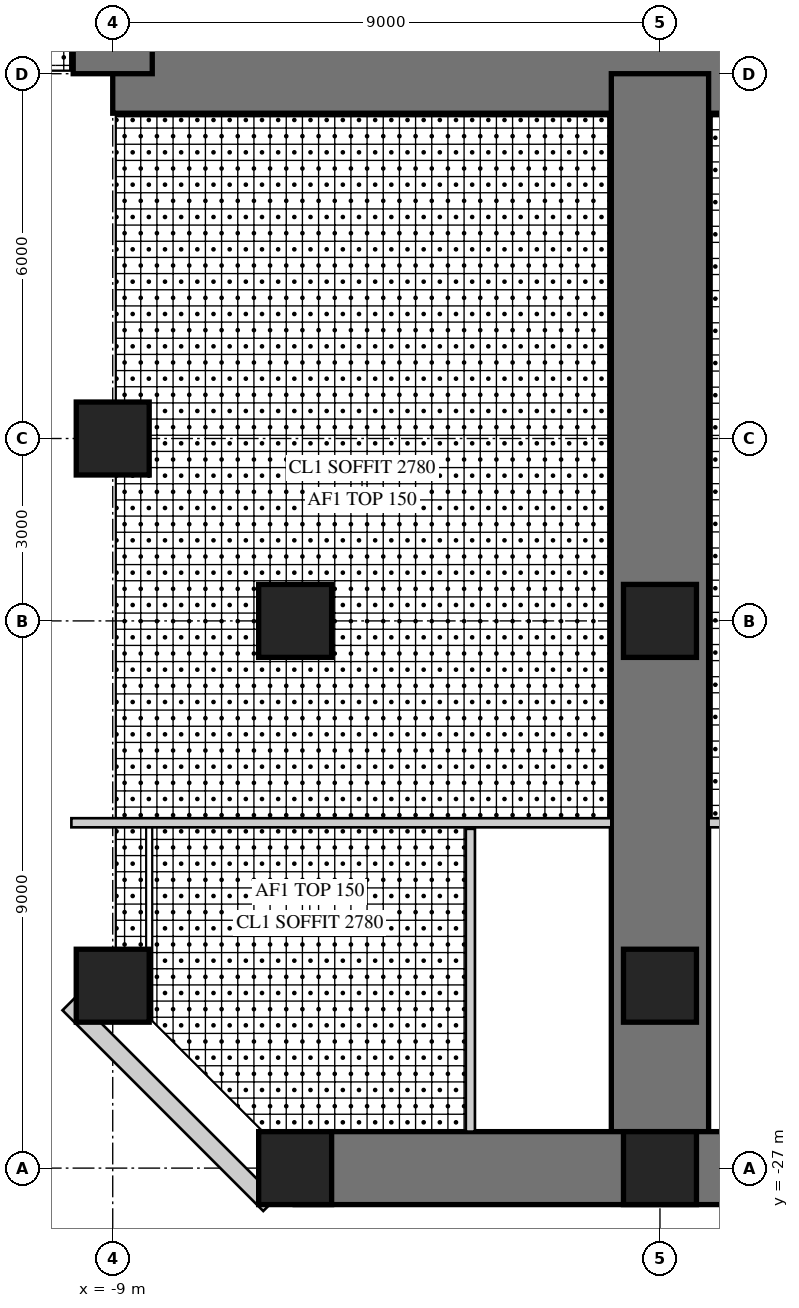
"""IFC4 building model, lengths in metres.
Left out: names, types, materials, properties, quantities, classifications, styles, units other than length and angle.
Written with IfcOpenShell. Run it as: python <this file> out.ifc"""

import sys

from ifc_helpers import new_model, si_unit, direction, frame, frame_2d, origin, origin_2d, place, context, subcontext, project, spatial, rectangle, hollow_rectangle, extrude, element, fill, save


model = new_model("IFC4")
c1 = context("Model", 3, precision=1e-05, world=origin(), true_north=direction((0.0, 1.0)))
c2 = subcontext(c1, "Body", "Model", "MODEL_VIEW")
j1 = project(units=[si_unit("LENGTHUNIT", "METRE"), si_unit("PLANEANGLEUNIT", "RADIAN")], contexts=[c1])
p1 = place(None, origin())
s1 = spatial("IfcSite", under=j1, at=p1, CompositionType="ELEMENT")
p2 = place(p1, origin())
s2 = spatial("IfcBuilding", under=s1, at=p2, CompositionType="ELEMENT")
p3 = place(p2, frame((0.0, 0.0, 27.5)))
s3 = spatial("IfcBuildingStorey", under=s2, at=p3, CompositionType="ELEMENT", Elevation=27.5)
p4 = place(p3, frame((-9.0, -9.0, 0.0), z_axis=(0.0, 0.0, 1.0), x_axis=(1.0, 0.0, 0.0)))
e1 = element("IfcWall", 1, at=p4, inside=s3, PredefinedType="SHEAR", context=c2, shape_type="SweptSolid", body=[
    extrude(rectangle(XDim=18.0, YDim=1.3, at=frame_2d((9.0, 0.0))), origin(), (0.0, 0.0, 1.0), 4.0),
])
p5 = place(p4, frame((9.8, 0.0, 0.0)))
e2 = element("IfcOpeningElement", 2, at=p5, cuts=e1, PredefinedType="OPENING", context=c2, shape_type="SweptSolid", body=[
    extrude(rectangle(XDim=1.0, YDim=2.4, at=frame_2d((0.5, 1.2))), frame((0.0, 0.66, 0.0), z_axis=(0.0, -1.0, 0.0), x_axis=(1.0, 0.0, 0.0)), (0.0, 0.0, 1.0), 1.32),
])
p6 = place(p3, frame((-9.0, 9.0, 0.0), z_axis=(0.0, 0.0, 1.0), x_axis=(0.0, -1.0, 0.0)))
e3 = element("IfcWall", 3, at=p6, inside=s3, PredefinedType="SHEAR", context=c2, shape_type="SweptSolid", body=[
    extrude(rectangle(XDim=18.0, YDim=1.3, at=frame_2d((9.0, 0.0))), origin(), (0.0, 0.0, 1.0), 4.0),
])
p7 = place(p6, frame((9.8, 0.0, 0.0)))
e4 = element("IfcOpeningElement", 4, at=p7, cuts=e3, PredefinedType="OPENING", context=c2, shape_type="SweptSolid", body=[
    extrude(rectangle(XDim=1.0, YDim=2.4, at=frame_2d((0.5, 1.2))), frame((0.0, 0.66, 0.0), z_axis=(0.0, -1.0, 0.0), x_axis=(1.0, 0.0, 0.0)), (0.0, 0.0, 1.0), 1.32),
])
p8 = place(p3, frame((0.0, -9.0, 0.0), z_axis=(0.0, 0.0, 1.0), x_axis=(0.0, -1.0, 0.0)))
e5 = element("IfcWall", 5, at=p8, inside=s3, PredefinedType="SHEAR", context=c2, shape_type="SweptSolid", body=[
    extrude(rectangle(XDim=18.0, YDim=1.6, at=frame_2d((9.0, 0.0))), origin(), (0.0, 0.0, 1.0), 4.0),
])
p9 = place(p8, frame((9.9, 0.0, 0.0)))
e6 = element("IfcOpeningElement", 6, at=p9, cuts=e5, PredefinedType="OPENING", context=c2, shape_type="SweptSolid", body=[
    extrude(rectangle(XDim=1.0, YDim=2.2, at=frame_2d((0.5, 1.1))), frame((0.0, 0.81, 0.0), z_axis=(0.0, -1.0, 0.0), x_axis=(1.0, 0.0, 0.0)), (0.0, 0.0, 1.0), 1.62),
])
p10 = place(p3, frame((-6.0, -27.0, 0.0), z_axis=(0.0, 0.0, 1.0), x_axis=(1.0, 0.0, 0.0)))
e7 = element("IfcWall", 7, at=p10, inside=s3, PredefinedType="SHEAR", context=c2, shape_type="SweptSolid", body=[
    extrude(rectangle(XDim=12.0, YDim=1.2, at=frame_2d((6.0, 0.0))), origin(), (0.0, 0.0, 1.0), 4.0),
])
p11 = place(p10, frame((1.5, 0.0, 0.6)))
e8 = element("IfcOpeningElement", 8, at=p11, cuts=e7, PredefinedType="OPENING", context=c2, shape_type="SweptSolid", body=[
    extrude(rectangle(XDim=3.0, YDim=2.4, at=frame_2d((1.5, 1.2))), frame((0.0, 0.61, 0.0), z_axis=(0.0, -1.0, 0.0), x_axis=(1.0, 0.0, 0.0)), (0.0, 0.0, 1.0), 1.22),
])
p12 = place(p10, frame((7.5, 0.0, 0.6)))
e9 = element("IfcOpeningElement", 9, at=p12, cuts=e7, PredefinedType="OPENING", context=c2, shape_type="SweptSolid", body=[
    extrude(rectangle(XDim=3.0, YDim=2.4, at=frame_2d((1.5, 1.2))), frame((0.0, 0.61, 0.0), z_axis=(0.0, -1.0, 0.0), x_axis=(1.0, 0.0, 0.0)), (0.0, 0.0, 1.0), 1.22),
])
for number, where, z_axis, x_axis in (
    (10, (-9.0, -15.0, 0.0), (0.0, 0.0, 1.0), (1.0, 0.0, 0.0)),
    (11, (-9.0, -24.0, 0.0), (0.0, 0.0, 1.0), (1.0, 0.0, 0.0)),
    (12, (-6.0, -27.0, 0.0), (0.0, 0.0, 1.0), (1.0, 0.0, 0.0)),
    (13, (0.0, -27.0, 0.0), (0.0, 0.0, 1.0), (1.0, 0.0, 0.0)),
    (14, (-6.0, -18.0, 0.0), (0.0, 0.0, 1.0), (1.0, 0.0, 0.0)),
    (15, (0.0, -18.0, 0.0), (0.0, 0.0, 1.0), (1.0, 0.0, 0.0)),
    (16, (0.0, -24.0, 0.0), (0.0, 0.0, 1.0), (1.0, 0.0, 0.0)),
):
    element("IfcColumn", number, at=place(p3, frame(where, z_axis=z_axis, x_axis=x_axis)), inside=s3, PredefinedType="COLUMN", context=c2, shape_type="SweptSolid", body=[
        extrude(rectangle(XDim=1.2, YDim=1.2, at=origin_2d()), origin(), (0.0, 0.0, 1.0), 4.0),
    ])
p13 = place(p3, frame((-9.72, -24.298, 0.0), z_axis=(0.0, 0.0, 1.0), x_axis=(0.707106781187, -0.707106781187, 0.0)))
e17 = element("IfcWall", 17, at=p13, inside=s3, PredefinedType="SOLIDWALL", context=c2, shape_type="SweptSolid", body=[
    extrude(rectangle(XDim=4.669, YDim=0.3, at=frame_2d((2.335, 0.0))), origin(), (0.0, 0.0, 1.0), 3.8),
])
p14 = place(p13, frame((1.885, 0.0, 0.3)))
e18 = element("IfcOpeningElement", 18, at=p14, cuts=e17, PredefinedType="OPENING", context=c2, shape_type="SweptSolid", body=[
    extrude(rectangle(XDim=0.9, YDim=2.4, at=frame_2d((0.45, 1.2))), frame((0.0, 0.16, 0.0), z_axis=(0.0, -1.0, 0.0), x_axis=(1.0, 0.0, 0.0)), (0.0, 0.0, 1.0), 0.32),
])
p15 = place(p3, frame((0.8, -21.32, 0.0), z_axis=(0.0, 0.0, 1.0), x_axis=(1.0, 0.0, 0.0)))
e19 = element("IfcWall", 19, at=p15, inside=s3, PredefinedType="PARTITIONING", context=c2, shape_type="SweptSolid", body=[
    extrude(rectangle(XDim=8.88, YDim=0.15, at=frame_2d((4.44, 0.0))), origin(), (0.0, 0.0, 1.0), 3.8),
])
p16 = place(p15, frame((0.35, 0.0, 0.0)))
e20 = element("IfcOpeningElement", 20, at=p16, cuts=e19, PredefinedType="OPENING", context=c2, shape_type="SweptSolid", body=[
    extrude(rectangle(XDim=1.0, YDim=2.2, at=frame_2d((0.5, 1.1))), frame((0.0, 0.085, 0.0), z_axis=(0.0, -1.0, 0.0), x_axis=(1.0, 0.0, 0.0)), (0.0, 0.0, 1.0), 0.17),
])
p17 = place(p15, frame((2.793, 0.0, 0.0)))
e21 = element("IfcOpeningElement", 21, at=p17, cuts=e19, PredefinedType="OPENING", context=c2, shape_type="SweptSolid", body=[
    extrude(rectangle(XDim=1.0, YDim=2.2, at=frame_2d((0.5, 1.1))), frame((0.0, 0.085, 0.0), z_axis=(0.0, -1.0, 0.0), x_axis=(1.0, 0.0, 0.0)), (0.0, 0.0, 1.0), 0.17),
])
p18 = place(p3, frame((-3.118, -21.42, 0.0), z_axis=(0.0, 0.0, 1.0), x_axis=(0.0, -1.0, 0.0)))
e22 = element("IfcWall", 22, at=p18, inside=s3, PredefinedType="PARTITIONING", context=c2, shape_type="SweptSolid", body=[
    extrude(rectangle(XDim=4.98, YDim=0.15, at=frame_2d((2.49, 0.0))), origin(), (0.0, 0.0, 1.0), 3.8),
])
p19 = place(p3, frame((-9.68, -21.32, 0.0), z_axis=(0.0, 0.0, 1.0), x_axis=(1.0, 0.0, 0.0)))
e23 = element("IfcWall", 23, at=p19, inside=s3, PredefinedType="PARTITIONING", context=c2, shape_type="SweptSolid", body=[
    extrude(rectangle(XDim=8.88, YDim=0.15, at=frame_2d((4.44, 0.0))), origin(), (0.0, 0.0, 1.0), 3.8),
])
p20 = place(p19, frame((5.087, 0.0, 0.0)))
e24 = element("IfcOpeningElement", 24, at=p20, cuts=e23, PredefinedType="OPENING", context=c2, shape_type="SweptSolid", body=[
    extrude(rectangle(XDim=1.0, YDim=2.2, at=frame_2d((0.5, 1.1))), frame((0.0, 0.085, 0.0), z_axis=(0.0, -1.0, 0.0), x_axis=(1.0, 0.0, 0.0)), (0.0, 0.0, 1.0), 0.17),
])
p21 = place(p19, frame((7.53, 0.0, 0.0)))
e25 = element("IfcOpeningElement", 25, at=p21, cuts=e23, PredefinedType="OPENING", context=c2, shape_type="SweptSolid", body=[
    extrude(rectangle(XDim=1.0, YDim=2.2, at=frame_2d((0.5, 1.1))), frame((0.0, 0.085, 0.0), z_axis=(0.0, -1.0, 0.0), x_axis=(1.0, 0.0, 0.0)), (0.0, 0.0, 1.0), 0.17),
])
p22 = place(p14, origin())
e26 = element("IfcWindow", 26, at=p22, inside=s3, PartitioningType="SINGLE_PANEL", PredefinedType="WINDOW", context=c2, shape_type="SweptSolid", body=[
    extrude(hollow_rectangle(XDim=0.9, YDim=2.4, WallThickness=0.06, at=frame_2d((0.45, 1.2))), frame((0.0, 0.03, 0.0), z_axis=(0.0, -1.0, 0.0), x_axis=(1.0, 0.0, 0.0)), (0.0, 0.0, 1.0), 0.06),
    extrude(rectangle(XDim=0.779, YDim=2.279, at=frame_2d((0.45, 1.2))), frame((0.0, 0.03, 0.0), z_axis=(0.0, -1.0, 0.0), x_axis=(1.0, 0.0, 0.0)), (0.0, 0.0, 1.0), 0.06),
])
fill(e18, e26)
p23 = place(p11, origin())
e27 = element("IfcWindow", 27, at=p23, inside=s3, PartitioningType="SINGLE_PANEL", PredefinedType="WINDOW", context=c2, shape_type="SweptSolid", body=[
    extrude(hollow_rectangle(XDim=3.0, YDim=2.4, WallThickness=0.06, at=frame_2d((1.5, 1.2))), frame((0.0, 0.03, 0.0), z_axis=(0.0, -1.0, 0.0), x_axis=(1.0, 0.0, 0.0)), (0.0, 0.0, 1.0), 0.06),
    extrude(rectangle(XDim=2.879, YDim=2.279, at=frame_2d((1.5, 1.2))), frame((0.0, 0.03, 0.0), z_axis=(0.0, -1.0, 0.0), x_axis=(1.0, 0.0, 0.0)), (0.0, 0.0, 1.0), 0.06),
])
fill(e8, e27)
p24 = place(p20, frame((1.0, 0.0, 0.0), z_axis=(0.0, 0.0, 1.0), x_axis=(-1.0, 0.0, 0.0)))
e28 = element("IfcDoor", 28, at=p24, inside=s3, OperationType="SINGLE_SWING_LEFT", PredefinedType="DOOR", context=c2, shape_type="SweptSolid", body=[
    extrude(rectangle(XDim=1.0, YDim=2.2, at=frame_2d((0.5, 1.1))), frame((0.0, 0.025, 0.0), z_axis=(0.0, -1.0, 0.0), x_axis=(1.0, 0.0, 0.0)), (0.0, 0.0, 1.0), 0.05),
])
fill(e24, e28)
p25 = place(p21, frame((1.0, 0.0, 0.0), z_axis=(0.0, 0.0, 1.0), x_axis=(-1.0, 0.0, 0.0)))
e29 = element("IfcDoor", 29, at=p25, inside=s3, OperationType="SINGLE_SWING_LEFT", PredefinedType="DOOR", context=c2, shape_type="SweptSolid", body=[
    extrude(rectangle(XDim=1.0, YDim=2.2, at=frame_2d((0.5, 1.1))), frame((0.0, 0.025, 0.0), z_axis=(0.0, -1.0, 0.0), x_axis=(1.0, 0.0, 0.0)), (0.0, 0.0, 1.0), 0.05),
])
fill(e25, e29)
p26 = place(p9, origin())
e30 = element("IfcDoor", 30, at=p26, inside=s3, OperationType="SINGLE_SWING_RIGHT", PredefinedType="DOOR", context=c2, shape_type="SweptSolid", body=[
    extrude(rectangle(XDim=1.0, YDim=2.2, at=frame_2d((0.5, 1.1))), frame((0.0, 0.025, 0.0), z_axis=(0.0, -1.0, 0.0), x_axis=(1.0, 0.0, 0.0)), (0.0, 0.0, 1.0), 0.05),
])
fill(e6, e30)
p27 = place(p5, frame((1.0, 0.0, 0.0), z_axis=(0.0, 0.0, 1.0), x_axis=(-1.0, 0.0, 0.0)))
e31 = element("IfcDoor", 31, at=p27, inside=s3, OperationType="SINGLE_SWING_RIGHT", PredefinedType="DOOR", context=c2, shape_type="SweptSolid", body=[
    extrude(rectangle(XDim=1.0, YDim=2.4, at=frame_2d((0.5, 1.2))), frame((0.0, -0.005, 0.0), z_axis=(0.0, -1.0, 0.0), x_axis=(1.0, 0.0, 0.0)), (0.0, 0.0, 1.0), 0.05),
])
fill(e2, e31)
save(model, sys.argv[1])
